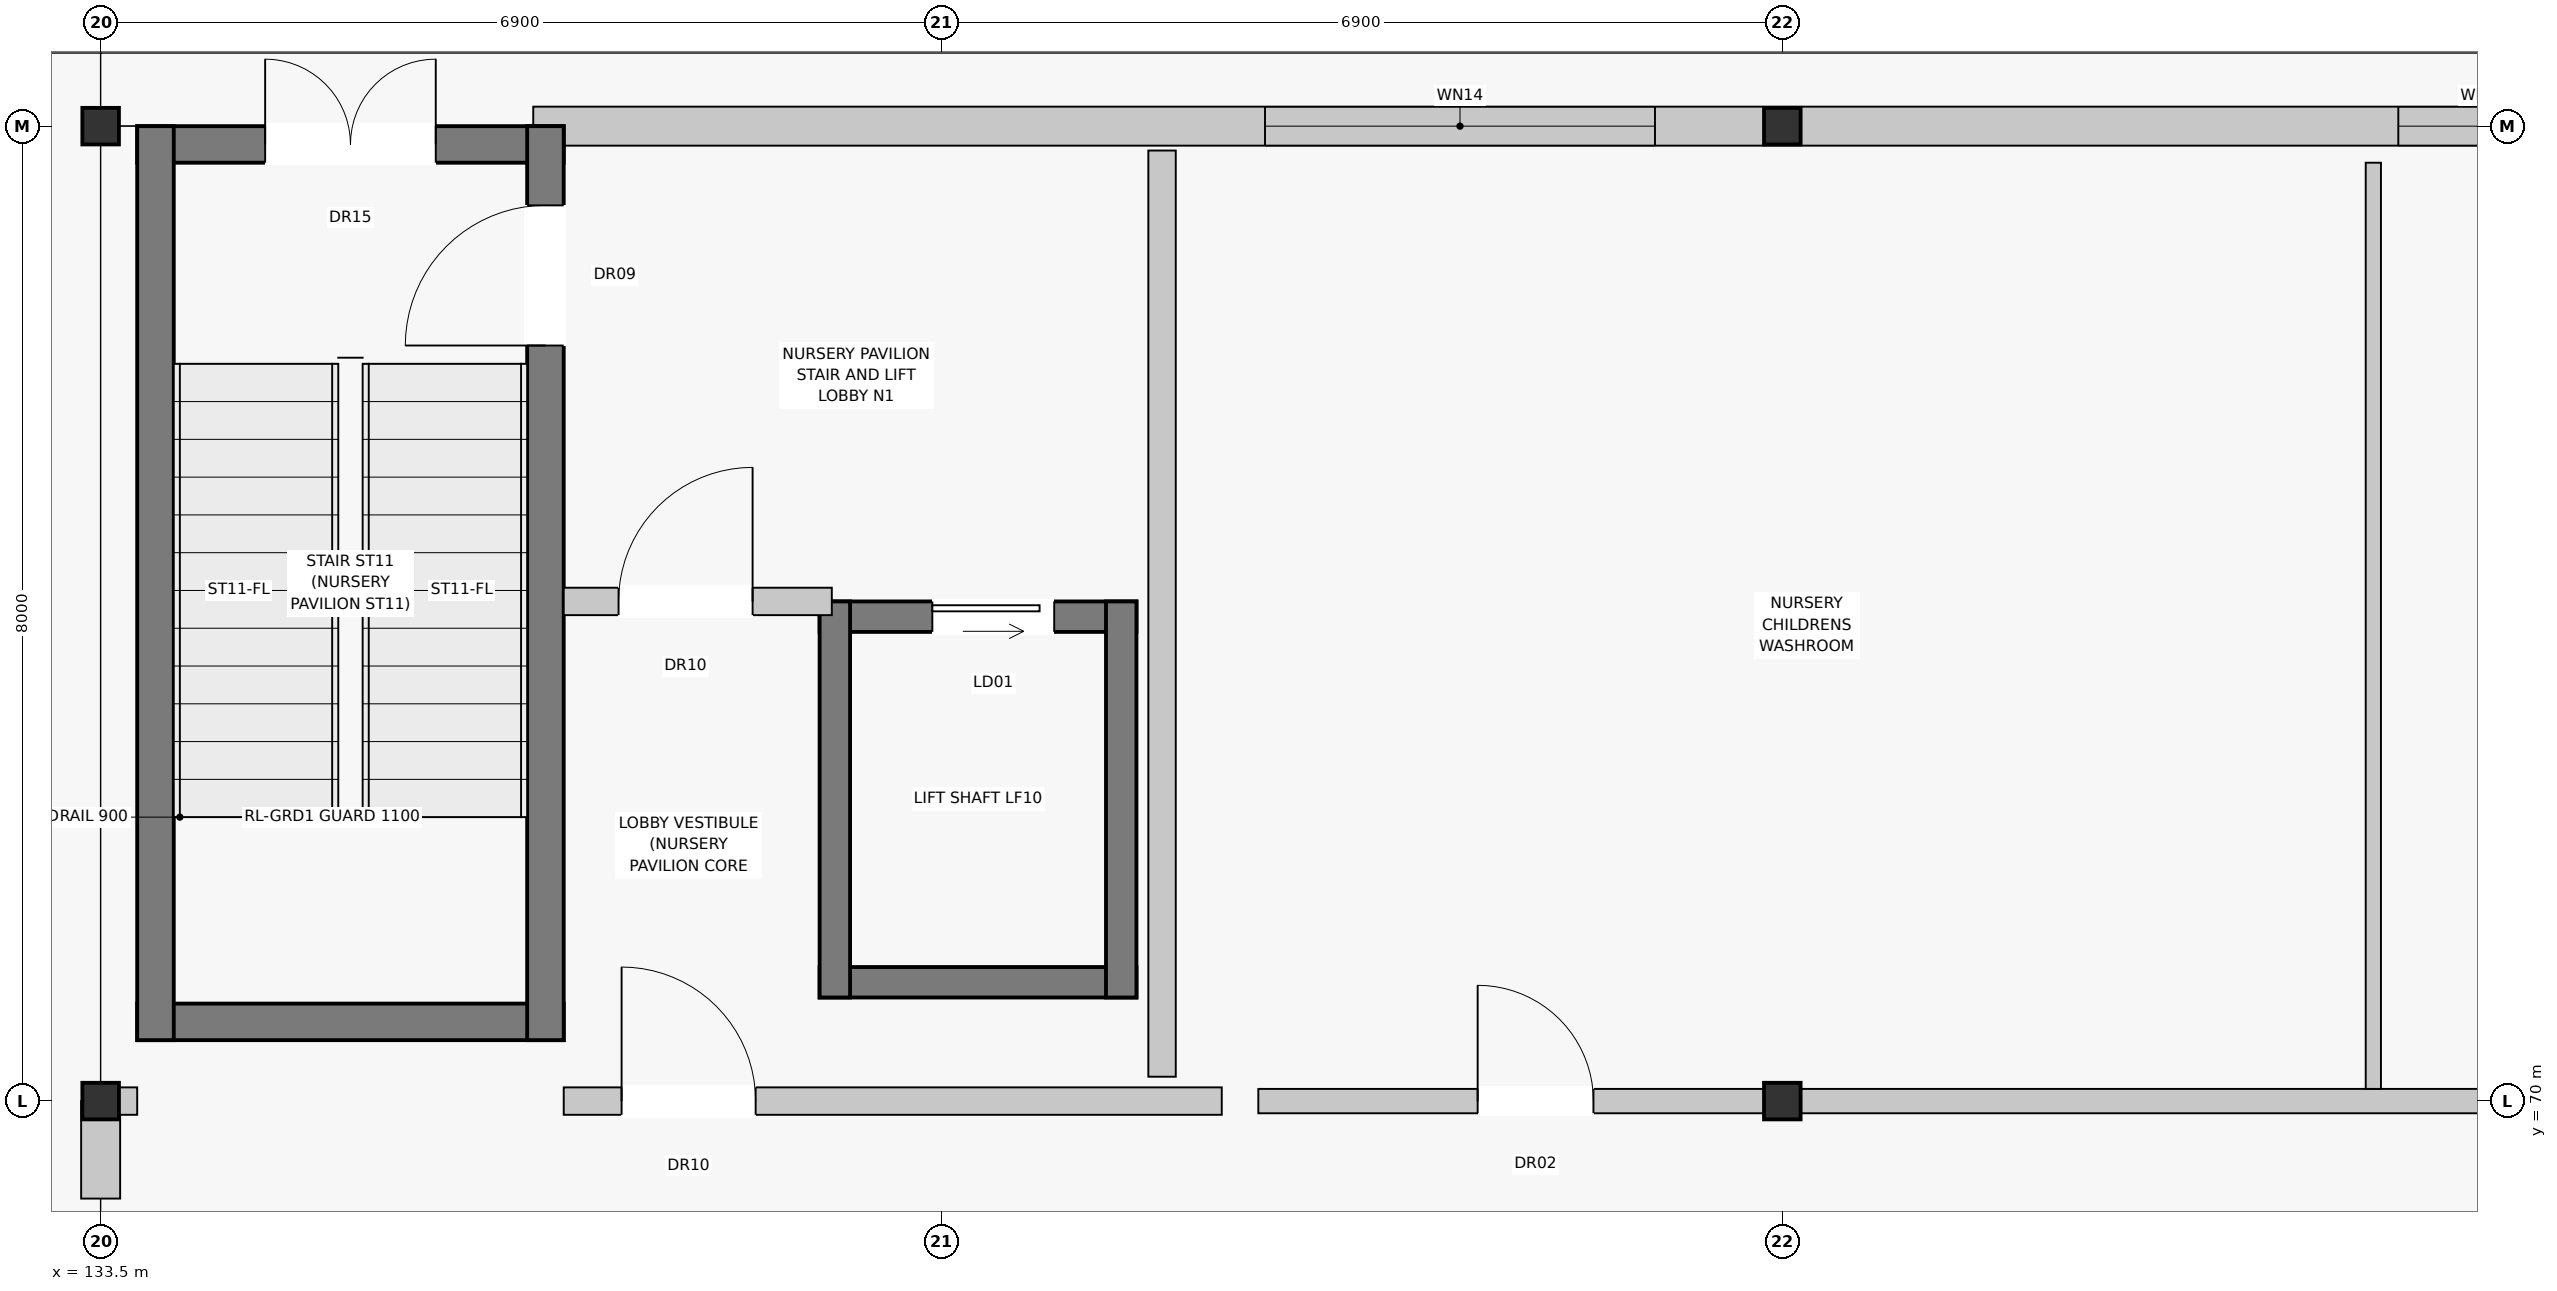
"""IFC4 building model, lengths in metres.
Left out: names, types, materials, properties, quantities, classifications, styles, units other than length and angle.
Written with IfcOpenShell. Run it as: python <this file> out.ifc"""

import sys

from ifc_helpers import new_model, si_unit, direction, frame, frame_2d, origin, origin_with_axes, origin_2d, place, context, subcontext, project, spatial, rectangle, i_section, extrude, element, fill, save


model = new_model("IFC4")
c1 = context("Model", 3, precision=1e-05, world=origin(), true_north=direction((0.0, 1.0)))
c2 = subcontext(c1, "Body", "Model", "MODEL_VIEW")
j1 = project(units=[si_unit("LENGTHUNIT", "METRE"), si_unit("PLANEANGLEUNIT", "RADIAN")], contexts=[c1])
p1 = place(None, origin())
s1 = spatial("IfcSite", under=j1, at=p1, CompositionType="ELEMENT")
p2 = place(p1, origin())
s2 = spatial("IfcBuilding", under=s1, at=p2, CompositionType="ELEMENT")
p3 = place(p2, origin())
s3 = spatial("IfcBuildingStorey", under=s2, at=p3, CompositionType="ELEMENT", Elevation=0.0)
for number, where, z_axis, x_axis in (
    (1, (133.5, 70.0, 0.0), (0.0, 0.0, 1.0), (1.0, 0.0, 0.0)),
    (2, (133.5, 78.0, 0.0), (0.0, 0.0, 1.0), (1.0, 0.0, 0.0)),
    (3, (147.3, 70.0, 0.0), (0.0, 0.0, 1.0), (1.0, 0.0, 0.0)),
    (4, (147.3, 78.0, 0.0), (0.0, 0.0, 1.0), (1.0, 0.0, 0.0)),
):
    element("IfcColumn", number, at=place(p3, frame(where, z_axis=z_axis, x_axis=x_axis)), inside=s3, PredefinedType="COLUMN", context=c2, shape_type="SweptSolid", body=[
        extrude(i_section(OverallWidth=0.3, OverallDepth=0.3, WebThickness=0.011, FlangeThickness=0.019, at=origin_2d()), origin(), (0.0, 0.0, 1.0), 4.4),
    ])
p4 = place(p3, frame((133.5, 69.2, 0.0), z_axis=(0.0, 0.0, 1.0), x_axis=(0.0, 1.0, 0.0)))
e5 = element("IfcWall", 5, at=p4, inside=s3, PredefinedType="STANDARD", context=c2, shape_type="SweptSolid", body=[
    extrude(rectangle(XDim=0.8, YDim=0.32, at=frame_2d((0.4, 0.0))), origin(), (0.0, 0.0, 1.0), 3.66),
])
p5 = place(p3, frame((137.05, 78.0, 0.0), z_axis=(0.0, 0.0, 1.0), x_axis=(1.0, 0.0, 0.0)))
e6 = element("IfcWall", 6, at=p5, inside=s3, PredefinedType="STANDARD", context=c2, shape_type="SweptSolid", body=[
    extrude(rectangle(XDim=22.2, YDim=0.32, at=frame_2d((11.1, 0.0))), origin(), (0.0, 0.0, 1.0), 3.57),
])
p6 = place(p5, frame((6.005, 0.0, 0.95)))
e7 = element("IfcOpeningElement", 7, at=p6, cuts=e6, PredefinedType="OPENING", context=c2, shape_type="SweptSolid", body=[
    extrude(rectangle(XDim=3.2, YDim=2.2, at=frame_2d((1.6, 1.1))), frame((0.0, 0.172, 0.0), z_axis=(0.0, -1.0, 0.0), x_axis=(1.0, 0.0, 0.0)), (0.0, 0.0, 1.0), 0.344),
])
p7 = place(p5, frame((15.305, 0.0, 1.05)))
e8 = element("IfcOpeningElement", 8, at=p7, cuts=e6, PredefinedType="OPENING", context=c2, shape_type="SweptSolid", body=[
    extrude(rectangle(XDim=1.4, YDim=1.25, at=frame_2d((0.7, 0.625))), frame((0.0, 0.172, 0.0), z_axis=(0.0, -1.0, 0.0), x_axis=(1.0, 0.0, 0.0)), (0.0, 0.0, 1.0), 0.344),
])
p8 = place(p3, frame((133.8, 77.85, 0.0), z_axis=(0.0, 0.0, 1.0), x_axis=(1.0, 0.0, 0.0)))
e9 = element("IfcWall", 9, at=p8, inside=s3, PredefinedType="SHEAR", context=c2, shape_type="SweptSolid", body=[
    extrude(rectangle(XDim=3.5, YDim=0.3, at=frame_2d((1.75, 0.0))), origin(), (0.0, 0.0, 1.0), 4.12),
])
p9 = place(p8, frame((1.05, 0.0, 0.0)))
e10 = element("IfcOpeningElement", 10, at=p9, cuts=e9, PredefinedType="OPENING", context=c2, shape_type="SweptSolid", body=[
    extrude(rectangle(XDim=1.4, YDim=2.25, at=frame_2d((0.7, 1.125))), frame((0.0, 0.162, 0.0), z_axis=(0.0, -1.0, 0.0), x_axis=(1.0, 0.0, 0.0)), (0.0, 0.0, 1.0), 0.324),
])
p10 = place(p3, frame((133.8, 70.65, 0.0), z_axis=(0.0, 0.0, 1.0), x_axis=(1.0, 0.0, 0.0)))
e11 = element("IfcWall", 11, at=p10, inside=s3, PredefinedType="SHEAR", context=c2, shape_type="SweptSolid", body=[
    extrude(rectangle(XDim=3.5, YDim=0.3, at=frame_2d((1.75, 0.0))), origin(), (0.0, 0.0, 1.0), 4.12),
])
p11 = place(p3, frame((133.95, 70.5, 0.0), z_axis=(0.0, 0.0, 1.0), x_axis=(0.0, 1.0, 0.0)))
e12 = element("IfcWall", 12, at=p11, inside=s3, PredefinedType="SHEAR", context=c2, shape_type="SweptSolid", body=[
    extrude(rectangle(XDim=7.5, YDim=0.3, at=frame_2d((3.75, 0.0))), origin(), (0.0, 0.0, 1.0), 4.12),
])
p12 = place(p3, frame((137.15, 70.5, 0.0), z_axis=(0.0, 0.0, 1.0), x_axis=(0.0, 1.0, 0.0)))
e13 = element("IfcWall", 13, at=p12, inside=s3, PredefinedType="SHEAR", context=c2, shape_type="SweptSolid", body=[
    extrude(rectangle(XDim=7.5, YDim=0.3, at=frame_2d((3.75, 0.0))), origin(), (0.0, 0.0, 1.0), 4.12),
])
p13 = place(p12, frame((5.7, 0.0, 0.0)))
e14 = element("IfcOpeningElement", 14, at=p13, cuts=e13, PredefinedType="OPENING", context=c2, shape_type="SweptSolid", body=[
    extrude(rectangle(XDim=1.15, YDim=2.15, at=frame_2d((0.575, 1.075))), frame((0.0, 0.162, 0.0), z_axis=(0.0, -1.0, 0.0), x_axis=(1.0, 0.0, 0.0)), (0.0, 0.0, 1.0), 0.324),
])
p14 = place(p3, frame((139.4, 73.975, 0.0), z_axis=(0.0, 0.0, 1.0), x_axis=(1.0, 0.0, 0.0)))
e15 = element("IfcWall", 15, at=p14, inside=s3, PredefinedType="SHEAR", context=c2, shape_type="SweptSolid", body=[
    extrude(rectangle(XDim=2.6, YDim=0.25, at=frame_2d((1.3, 0.0))), origin(), (0.0, 0.0, 1.0), 4.12),
])
p15 = place(p14, frame((0.925, 0.0, 0.0)))
e16 = element("IfcOpeningElement", 16, at=p15, cuts=e15, PredefinedType="OPENING", context=c2, shape_type="SweptSolid", body=[
    extrude(rectangle(XDim=1.0, YDim=2.1, at=frame_2d((0.5, 1.05))), frame((0.0, 0.137, 0.0), z_axis=(0.0, -1.0, 0.0), x_axis=(1.0, 0.0, 0.0)), (0.0, 0.0, 1.0), 0.274),
])
p16 = place(p3, frame((139.4, 70.975, 0.0), z_axis=(0.0, 0.0, 1.0), x_axis=(1.0, 0.0, 0.0)))
e17 = element("IfcWall", 17, at=p16, inside=s3, PredefinedType="SHEAR", context=c2, shape_type="SweptSolid", body=[
    extrude(rectangle(XDim=2.6, YDim=0.25, at=frame_2d((1.3, 0.0))), origin(), (0.0, 0.0, 1.0), 4.12),
])
for number, where, z_axis, x_axis in (
    (18, (139.525, 70.85, 0.0), (0.0, 0.0, 1.0), (0.0, 1.0, 0.0)),
    (19, (141.875, 70.85, 0.0), (0.0, 0.0, 1.0), (0.0, 1.0, 0.0)),
):
    element("IfcWall", number, at=place(p3, frame(where, z_axis=z_axis, x_axis=x_axis)), inside=s3, PredefinedType="SHEAR", context=c2, shape_type="SweptSolid", body=[
        extrude(rectangle(XDim=3.25, YDim=0.25, at=frame_2d((1.625, 0.0))), origin(), (0.0, 0.0, 1.0), 4.12),
    ])
p17 = place(p3, frame((142.21, 70.2, 0.0), z_axis=(0.0, 0.0, 1.0), x_axis=(0.0, 1.0, 0.0)))
e20 = element("IfcWall", 20, at=p17, inside=s3, PredefinedType="PARTITIONING", context=c2, shape_type="SweptSolid", body=[
    extrude(rectangle(XDim=7.6, YDim=0.225, at=frame_2d((3.8, 0.0))), origin(), (0.0, 0.0, 1.0), 4.12),
])
p18 = place(p3, frame((137.3, 74.1, 0.0), z_axis=(0.0, 0.0, 1.0), x_axis=(1.0, 0.0, 0.0)))
e21 = element("IfcWall", 21, at=p18, inside=s3, PredefinedType="PARTITIONING", context=c2, shape_type="SweptSolid", body=[
    extrude(rectangle(XDim=2.2, YDim=0.225, at=frame_2d((1.1, 0.0))), origin(), (0.0, 0.0, 1.0), 4.12),
])
p19 = place(p18, frame((0.45, 0.0, 0.0)))
e22 = element("IfcOpeningElement", 22, at=p19, cuts=e21, PredefinedType="OPENING", context=c2, shape_type="SweptSolid", body=[
    extrude(rectangle(XDim=1.1, YDim=2.15, at=frame_2d((0.55, 1.075))), frame((0.0, 0.125, 0.0), z_axis=(0.0, -1.0, 0.0), x_axis=(1.0, 0.0, 0.0)), (0.0, 0.0, 1.0), 0.249),
])
p20 = place(p3, frame((133.65, 70.0, 0.0), z_axis=(0.0, 0.0, 1.0), x_axis=(1.0, 0.0, 0.0)))
e23 = element("IfcWall", 23, at=p20, inside=s3, PredefinedType="PARTITIONING", context=c2, shape_type="SweptSolid", body=[
    extrude(rectangle(XDim=0.15, YDim=0.225, at=frame_2d((0.075, 0.0))), origin(), (0.0, 0.0, 1.0), 4.12),
])
p21 = place(p3, frame((137.3, 70.0, 0.0), z_axis=(0.0, 0.0, 1.0), x_axis=(1.0, 0.0, 0.0)))
e24 = element("IfcWall", 24, at=p21, inside=s3, PredefinedType="PARTITIONING", context=c2, shape_type="SweptSolid", body=[
    extrude(rectangle(XDim=5.4, YDim=0.225, at=frame_2d((2.7, 0.0))), origin(), (0.0, 0.0, 1.0), 3.67),
])
p22 = place(p21, frame((0.475, 0.0, 0.0)))
e25 = element("IfcOpeningElement", 25, at=p22, cuts=e24, PredefinedType="OPENING", context=c2, shape_type="SweptSolid", body=[
    extrude(rectangle(XDim=1.1, YDim=2.15, at=frame_2d((0.55, 1.075))), frame((0.0, 0.125, 0.0), z_axis=(0.0, -1.0, 0.0), x_axis=(1.0, 0.0, 0.0)), (0.0, 0.0, 1.0), 0.249),
])
p23 = place(p3, frame((143.0, 70.0, 0.0), z_axis=(0.0, 0.0, 1.0), x_axis=(1.0, 0.0, 0.0)))
e26 = element("IfcWall", 26, at=p23, inside=s3, PredefinedType="PARTITIONING", context=c2, shape_type="SweptSolid", body=[
    extrude(rectangle(XDim=15.5, YDim=0.2, at=frame_2d((7.75, 0.0))), origin(), (0.0, 0.0, 1.0), 3.57),
])
p24 = place(p23, frame((1.8, 0.0, 0.0)))
e27 = element("IfcOpeningElement", 27, at=p24, cuts=e26, PredefinedType="OPENING", context=c2, shape_type="SweptSolid", body=[
    extrude(rectangle(XDim=0.95, YDim=2.15, at=frame_2d((0.475, 1.075))), frame((0.0, 0.112, 0.0), z_axis=(0.0, -1.0, 0.0), x_axis=(1.0, 0.0, 0.0)), (0.0, 0.0, 1.0), 0.224),
])
p25 = place(p23, frame((10.5, 0.0, 0.0)))
e28 = element("IfcOpeningElement", 28, at=p25, cuts=e26, PredefinedType="OPENING", context=c2, shape_type="SweptSolid", body=[
    extrude(rectangle(XDim=0.95, YDim=2.15, at=frame_2d((0.475, 1.075))), frame((0.0, 0.112, 0.0), z_axis=(0.0, -1.0, 0.0), x_axis=(1.0, 0.0, 0.0)), (0.0, 0.0, 1.0), 0.224),
])
p26 = place(p3, frame((152.15, 70.1, 0.0), z_axis=(0.0, 0.0, 1.0), x_axis=(0.0, 1.0, 0.0)))
e29 = element("IfcWall", 29, at=p26, inside=s3, PredefinedType="PARTITIONING", context=c2, shape_type="SweptSolid", body=[
    extrude(rectangle(XDim=7.6, YDim=0.125, at=frame_2d((3.8, 0.0))), origin(), (0.0, 0.0, 1.0), 4.12),
])
p27 = place(p6, origin_with_axes())
e30 = element("IfcWindow", 30, at=p27, inside=s3, PartitioningType="SINGLE_PANEL", PredefinedType="WINDOW", context=c2, shape_type="SweptSolid", body=[
    extrude(rectangle(XDim=3.2, YDim=2.2, at=frame_2d((1.6, 1.1))), frame((0.0, 0.03, 0.0), z_axis=(0.0, -1.0, 0.0), x_axis=(1.0, 0.0, 0.0)), (0.0, 0.0, 1.0), 0.06),
])
fill(e7, e30)
p28 = place(p7, origin_with_axes())
e31 = element("IfcWindow", 31, at=p28, inside=s3, PartitioningType="SINGLE_PANEL", PredefinedType="WINDOW", context=c2, shape_type="SweptSolid", body=[
    extrude(rectangle(XDim=1.4, YDim=1.25, at=frame_2d((0.7, 0.625))), frame((0.0, 0.03, 0.0), z_axis=(0.0, -1.0, 0.0), x_axis=(1.0, 0.0, 0.0)), (0.0, 0.0, 1.0), 0.06),
])
fill(e8, e31)
p29 = place(p9, origin_with_axes())
e32 = element("IfcDoor", 32, at=p29, inside=s3, OperationType="DOUBLE_DOOR_SINGLE_SWING", PredefinedType="DOOR", context=c2, shape_type="SweptSolid", body=[
    extrude(rectangle(XDim=1.4, YDim=2.25, at=frame_2d((0.7, 1.125))), frame((0.0, 0.025, 0.0), z_axis=(0.0, -1.0, 0.0), x_axis=(1.0, 0.0, 0.0)), (0.0, 0.0, 1.0), 0.05),
])
fill(e10, e32)
p30 = place(p13, origin_with_axes())
e33 = element("IfcDoor", 33, at=p30, inside=s3, OperationType="SINGLE_SWING_LEFT", PredefinedType="DOOR", context=c2, shape_type="SweptSolid", body=[
    extrude(rectangle(XDim=1.15, YDim=2.15, at=frame_2d((0.575, 1.075))), frame((0.0, 0.025, 0.0), z_axis=(0.0, -1.0, 0.0), x_axis=(1.0, 0.0, 0.0)), (0.0, 0.0, 1.0), 0.05),
])
fill(e14, e33)
p31 = place(p15, origin_with_axes())
e34 = element("IfcDoor", 34, at=p31, inside=s3, OperationType="SLIDING_TO_LEFT", PredefinedType="DOOR", context=c2, shape_type="SweptSolid", body=[
    extrude(rectangle(XDim=1.0, YDim=2.1, at=frame_2d((0.5, 1.05))), frame((0.0, 0.025, 0.0), z_axis=(0.0, -1.0, 0.0), x_axis=(1.0, 0.0, 0.0)), (0.0, 0.0, 1.0), 0.05),
])
fill(e16, e34)
p32 = place(p19, origin_with_axes())
e35 = element("IfcDoor", 35, at=p32, inside=s3, OperationType="SINGLE_SWING_RIGHT", PredefinedType="DOOR", context=c2, shape_type="SweptSolid", body=[
    extrude(rectangle(XDim=1.1, YDim=2.15, at=frame_2d((0.55, 1.075))), frame((0.0, 0.025, 0.0), z_axis=(0.0, -1.0, 0.0), x_axis=(1.0, 0.0, 0.0)), (0.0, 0.0, 1.0), 0.05),
])
fill(e22, e35)
p33 = place(p22, origin_with_axes())
e36 = element("IfcDoor", 36, at=p33, inside=s3, OperationType="SINGLE_SWING_LEFT", PredefinedType="DOOR", context=c2, shape_type="SweptSolid", body=[
    extrude(rectangle(XDim=1.1, YDim=2.15, at=frame_2d((0.55, 1.075))), frame((0.0, 0.025, 0.0), z_axis=(0.0, -1.0, 0.0), x_axis=(1.0, 0.0, 0.0)), (0.0, 0.0, 1.0), 0.05),
])
fill(e25, e36)
p34 = place(p24, origin_with_axes())
e37 = element("IfcDoor", 37, at=p34, inside=s3, OperationType="SINGLE_SWING_LEFT", PredefinedType="DOOR", context=c2, shape_type="SweptSolid", body=[
    extrude(rectangle(XDim=0.95, YDim=2.15, at=frame_2d((0.475, 1.075))), frame((0.0, 0.025, 0.0), z_axis=(0.0, -1.0, 0.0), x_axis=(1.0, 0.0, 0.0)), (0.0, 0.0, 1.0), 0.05),
])
fill(e27, e37)
save(model, sys.argv[1])
